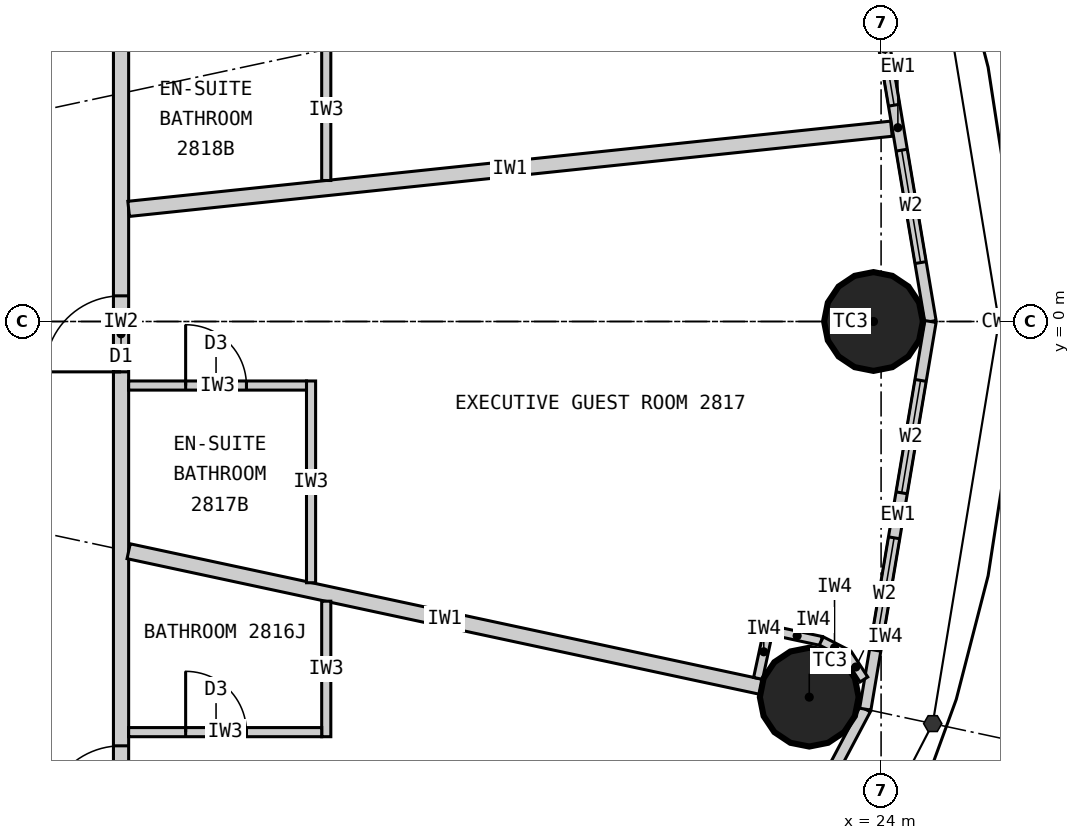
"""IFC4 building model, lengths in metres.
Left out: names, types, materials, properties, quantities, classifications, styles, units other than length and angle.
Written with IfcOpenShell. Run it as: python <this file> out.ifc"""

import sys

from ifc_helpers import new_model, si_unit, direction, frame, frame_2d, origin, origin_2d, place, context, subcontext, project, spatial, rectangle, circle, extrude, element, fill, save


model = new_model("IFC4")
c1 = context("Model", 3, precision=1e-05, world=origin(), true_north=direction((0.0, 1.0)))
c2 = subcontext(c1, "Body", "Model", "MODEL_VIEW")
j1 = project(units=[si_unit("LENGTHUNIT", "METRE"), si_unit("PLANEANGLEUNIT", "RADIAN")], contexts=[c1])
p1 = place(None, origin())
s1 = spatial("IfcSite", under=j1, at=p1, CompositionType="ELEMENT")
p2 = place(p1, origin())
s2 = spatial("IfcBuilding", under=s1, at=p2, CompositionType="ELEMENT")
p3 = place(p2, frame((0.0, 0.0, 112.2)))
s3 = spatial("IfcBuildingStorey", under=s2, at=p3, CompositionType="ELEMENT", Elevation=112.2)
for number, where, z_axis, x_axis in (
    (1, (23.9, 0.0, 0.0), (0.0, 0.0, 1.0), (1.0, 0.0, 0.0)),
    (2, (23.055, -4.942, 0.0), (0.0, 0.0, 1.0), (1.0, 0.0, 0.0)),
):
    element("IfcColumn", number, at=place(p3, frame(where, z_axis=z_axis, x_axis=x_axis)), inside=s3, PredefinedType="COLUMN", context=c2, shape_type="SweptSolid", body=[
        extrude(circle(Radius=0.65, at=origin_2d()), origin(), (0.0, 0.0, 1.0), 3.3),
    ])
p4 = place(p3, frame((24.65, 0.0, 0.0), z_axis=(0.0, 0.0, 1.0), x_axis=(-0.165883894218, 0.986145290329, 0.0)))
e3 = element("IfcWall", 3, at=p4, inside=s3, PredefinedType="ELEMENTEDWALL", context=c2, shape_type="SweptSolid", body=[
    extrude(rectangle(XDim=5.172, YDim=0.15, at=frame_2d((2.586, 0.0))), origin(), (0.0, 0.0, 1.0), 3.12),
])
p5 = place(p4, frame((0.786, 0.0, 0.9)))
e4 = element("IfcOpeningElement", 4, at=p5, cuts=e3, PredefinedType="OPENING", context=c2, shape_type="SweptSolid", body=[
    extrude(rectangle(XDim=1.5, YDim=1.9, at=frame_2d((0.75, 0.95))), frame((0.0, 0.085, 0.0), z_axis=(0.0, -1.0, 0.0), x_axis=(1.0, 0.0, 0.0)), (0.0, 0.0, 1.0), 0.17),
])
p6 = place(p4, frame((2.886, 0.0, 0.9)))
e5 = element("IfcOpeningElement", 5, at=p6, cuts=e3, PredefinedType="OPENING", context=c2, shape_type="SweptSolid", body=[
    extrude(rectangle(XDim=1.5, YDim=1.9, at=frame_2d((0.75, 0.95))), frame((0.0, 0.085, 0.0), z_axis=(0.0, -1.0, 0.0), x_axis=(1.0, 0.0, 0.0)), (0.0, 0.0, 1.0), 0.17),
])
p7 = place(p3, frame((21.287, -9.832, 0.0), z_axis=(0.0, 0.0, 1.0), x_axis=(0.467814388454, 0.883826735257, 0.0)))
e6 = element("IfcWall", 6, at=p7, inside=s3, PredefinedType="ELEMENTEDWALL", context=c2, shape_type="SweptSolid", body=[
    extrude(rectangle(XDim=5.354, YDim=0.15, at=frame_2d((2.677, 0.0))), origin(), (0.0, 0.0, 1.0), 3.12),
])
p8 = place(p7, frame((0.877, 0.0, 0.9)))
e7 = element("IfcOpeningElement", 7, at=p8, cuts=e6, PredefinedType="OPENING", context=c2, shape_type="SweptSolid", body=[
    extrude(rectangle(XDim=1.5, YDim=1.9, at=frame_2d((0.75, 0.95))), frame((0.0, 0.085, 0.0), z_axis=(0.0, -1.0, 0.0), x_axis=(1.0, 0.0, 0.0)), (0.0, 0.0, 1.0), 0.17),
])
p9 = place(p7, frame((2.977, 0.0, 0.9)))
e8 = element("IfcOpeningElement", 8, at=p9, cuts=e6, PredefinedType="OPENING", context=c2, shape_type="SweptSolid", body=[
    extrude(rectangle(XDim=1.5, YDim=1.9, at=frame_2d((0.75, 0.95))), frame((0.0, 0.085, 0.0), z_axis=(0.0, -1.0, 0.0), x_axis=(1.0, 0.0, 0.0)), (0.0, 0.0, 1.0), 0.17),
])
p10 = place(p3, frame((23.792, -5.1, 0.0), z_axis=(0.0, 0.0, 1.0), x_axis=(0.165883894218, 0.986145290329, 0.0)))
e9 = element("IfcWall", 9, at=p10, inside=s3, PredefinedType="ELEMENTEDWALL", context=c2, shape_type="SweptSolid", body=[
    extrude(rectangle(XDim=5.172, YDim=0.15, at=frame_2d((2.586, 0.0))), origin(), (0.0, 0.0, 1.0), 3.12),
])
p11 = place(p10, frame((0.786, 0.0, 0.9)))
e10 = element("IfcOpeningElement", 10, at=p11, cuts=e9, PredefinedType="OPENING", context=c2, shape_type="SweptSolid", body=[
    extrude(rectangle(XDim=1.5, YDim=1.9, at=frame_2d((0.75, 0.95))), frame((0.0, 0.085, 0.0), z_axis=(0.0, -1.0, 0.0), x_axis=(1.0, 0.0, 0.0)), (0.0, 0.0, 1.0), 0.17),
])
p12 = place(p10, frame((2.886, 0.0, 0.9)))
e11 = element("IfcOpeningElement", 11, at=p12, cuts=e9, PredefinedType="OPENING", context=c2, shape_type="SweptSolid", body=[
    extrude(rectangle(XDim=1.5, YDim=1.9, at=frame_2d((0.75, 0.95))), frame((0.0, 0.085, 0.0), z_axis=(0.0, -1.0, 0.0), x_axis=(1.0, 0.0, 0.0)), (0.0, 0.0, 1.0), 0.17),
])
p13 = place(p3, frame((14.0, -9.9, 0.0), z_axis=(0.0, 0.0, 1.0), x_axis=(0.0, 1.0, 0.0)))
e12 = element("IfcWall", 12, at=p13, inside=s3, PredefinedType="PARTITIONING", context=c2, shape_type="SweptSolid", body=[
    extrude(rectangle(XDim=19.8, YDim=0.2, at=frame_2d((9.9, 0.0))), origin(), (0.0, 0.0, 1.0), 3.12),
])
p14 = place(p13, frame((3.318, 0.0, 0.0)))
e13 = element("IfcOpeningElement", 13, at=p14, cuts=e12, PredefinedType="OPENING", context=c2, shape_type="SweptSolid", body=[
    extrude(rectangle(XDim=1.0, YDim=2.2, at=frame_2d((0.5, 1.1))), frame((0.0, 0.11, 0.0), z_axis=(0.0, -1.0, 0.0), x_axis=(1.0, 0.0, 0.0)), (0.0, 0.0, 1.0), 0.22),
])
p15 = place(p13, frame((9.238, 0.0, 0.0)))
e14 = element("IfcOpeningElement", 14, at=p15, cuts=e12, PredefinedType="OPENING", context=c2, shape_type="SweptSolid", body=[
    extrude(rectangle(XDim=1.0, YDim=2.2, at=frame_2d((0.5, 1.1))), frame((0.0, 0.11, 0.0), z_axis=(0.0, -1.0, 0.0), x_axis=(1.0, 0.0, 0.0)), (0.0, 0.0, 1.0), 0.22),
])
p16 = place(p13, frame((13.742, 0.0, 0.0)))
e15 = element("IfcOpeningElement", 15, at=p16, cuts=e12, PredefinedType="OPENING", context=c2, shape_type="SweptSolid", body=[
    extrude(rectangle(XDim=1.0, YDim=2.2, at=frame_2d((0.5, 1.1))), frame((0.0, 0.11, 0.0), z_axis=(0.0, -1.0, 0.0), x_axis=(1.0, 0.0, 0.0)), (0.0, 0.0, 1.0), 0.22),
])
p17 = place(p13, frame((18.698, 0.0, 0.0)))
e16 = element("IfcOpeningElement", 16, at=p17, cuts=e12, PredefinedType="OPENING", context=c2, shape_type="SweptSolid", body=[
    extrude(rectangle(XDim=1.0, YDim=2.2, at=frame_2d((0.5, 1.1))), frame((0.0, 0.11, 0.0), z_axis=(0.0, -1.0, 0.0), x_axis=(1.0, 0.0, 0.0)), (0.0, 0.0, 1.0), 0.22),
])
p18 = place(p3, frame((14.1, 1.482, 0.0), z_axis=(0.0, 0.0, 1.0), x_axis=(0.994523202615, 0.104516024894, 0.0)))
e17 = element("IfcWall", 17, at=p18, inside=s3, PredefinedType="PARTITIONING", context=c2, shape_type="SweptSolid", body=[
    extrude(rectangle(XDim=10.091, YDim=0.2, at=frame_2d((5.045, 0.0))), origin(), (0.0, 0.0, 1.0), 2.47),
])
p19 = place(p3, frame((14.1, -3.022, 0.0), z_axis=(0.0, 0.0, 1.0), x_axis=(0.977783513367, -0.209617272638, 0.0)))
e18 = element("IfcWall", 18, at=p19, inside=s3, PredefinedType="PARTITIONING", context=c2, shape_type="SweptSolid", body=[
    extrude(rectangle(XDim=8.508, YDim=0.2, at=frame_2d((4.254, 0.0))), origin(), (0.0, 0.0, 1.0), 2.37),
])
p20 = place(p3, frame((16.7, -3.68, 0.0), z_axis=(0.0, 0.0, 1.0), x_axis=(0.0, -1.0, 0.0)))
e19 = element("IfcWall", 19, at=p20, inside=s3, PredefinedType="PARTITIONING", context=c2, shape_type="SweptSolid", body=[
    extrude(rectangle(XDim=1.783, YDim=0.12, at=frame_2d((0.891, 0.0))), origin(), (0.0, 0.0, 1.0), 3.12),
])
p21 = place(p3, frame((14.1, -5.403, 0.0), z_axis=(0.0, 0.0, 1.0), x_axis=(1.0, 0.0, 0.0)))
e20 = element("IfcWall", 20, at=p21, inside=s3, PredefinedType="PARTITIONING", context=c2, shape_type="SweptSolid", body=[
    extrude(rectangle(XDim=2.54, YDim=0.12, at=frame_2d((1.27, 0.0))), origin(), (0.0, 0.0, 1.0), 3.12),
])
p22 = place(p21, frame((0.75, 0.0, 0.0)))
e21 = element("IfcOpeningElement", 21, at=p22, cuts=e20, PredefinedType="OPENING", context=c2, shape_type="SweptSolid", body=[
    extrude(rectangle(XDim=0.8, YDim=2.1, at=frame_2d((0.4, 1.05))), frame((0.0, 0.07, 0.0), z_axis=(0.0, -1.0, 0.0), x_axis=(1.0, 0.0, 0.0)), (0.0, 0.0, 1.0), 0.14),
])
p23 = place(p3, frame((16.5, -3.437, 0.0), z_axis=(0.0, 0.0, 1.0), x_axis=(0.0, 1.0, 0.0)))
e22 = element("IfcWall", 22, at=p23, inside=s3, PredefinedType="PARTITIONING", context=c2, shape_type="SweptSolid", body=[
    extrude(rectangle(XDim=2.655, YDim=0.12, at=frame_2d((1.327, 0.0))), origin(), (0.0, 0.0, 1.0), 3.12),
])
p24 = place(p3, frame((14.1, -0.843, 0.0), z_axis=(0.0, 0.0, 1.0), x_axis=(1.0, 0.0, 0.0)))
e23 = element("IfcWall", 23, at=p24, inside=s3, PredefinedType="PARTITIONING", context=c2, shape_type="SweptSolid", body=[
    extrude(rectangle(XDim=2.34, YDim=0.12, at=frame_2d((1.17, 0.0))), origin(), (0.0, 0.0, 1.0), 3.12),
])
p25 = place(p24, frame((0.75, 0.0, 0.0)))
e24 = element("IfcOpeningElement", 24, at=p25, cuts=e23, PredefinedType="OPENING", context=c2, shape_type="SweptSolid", body=[
    extrude(rectangle(XDim=0.8, YDim=2.1, at=frame_2d((0.4, 1.05))), frame((0.0, 0.07, 0.0), z_axis=(0.0, -1.0, 0.0), x_axis=(1.0, 0.0, 0.0)), (0.0, 0.0, 1.0), 0.14),
])
p26 = place(p3, frame((16.7, 1.855, 0.0), z_axis=(0.0, 0.0, 1.0), x_axis=(0.0, 1.0, 0.0)))
e25 = element("IfcWall", 25, at=p26, inside=s3, PredefinedType="PARTITIONING", context=c2, shape_type="SweptSolid", body=[
    extrude(rectangle(XDim=1.867, YDim=0.12, at=frame_2d((0.933, 0.0))), origin(), (0.0, 0.0, 1.0), 3.12),
])
p27 = place(p3, frame((22.382, -4.695, 0.0), z_axis=(0.0, 0.0, 1.0), x_axis=(0.209808658628, 0.977742464438, 0.0)))
e26 = element("IfcWall", 26, at=p27, inside=s3, PredefinedType="PARTITIONING", context=c2, shape_type="SweptSolid", body=[
    extrude(rectangle(XDim=0.716, YDim=0.12, at=frame_2d((0.358, 0.0))), origin(), (0.0, 0.0, 1.0), 3.12),
])
p28 = place(p3, frame((22.578, -4.067, 0.0), z_axis=(0.0, 0.0, 1.0), x_axis=(0.977802414077, -0.209529088731, 0.0)))
e27 = element("IfcWall", 27, at=p28, inside=s3, PredefinedType="PARTITIONING", context=c2, shape_type="SweptSolid", body=[
    extrude(rectangle(XDim=0.65, YDim=0.12, at=frame_2d((0.325, 0.0))), origin(), (0.0, 0.0, 1.0), 3.12),
])
for number, where, z_axis, x_axis in (
    (28, (23.213, -4.203, 0.0), (0.0, 0.0, 1.0), (0.89, -0.456, 0.0)),
    (29, (23.562, -4.381, 0.0), (0.0, 0.0, 1.0), (0.543, -0.84, 0.0)),
):
    element("IfcWall", number, at=place(p3, frame(where, z_axis=z_axis, x_axis=x_axis)), inside=s3, PredefinedType="PARTITIONING", context=c2, shape_type="SweptSolid", body=[
        extrude(rectangle(XDim=0.391, YDim=0.12, at=frame_2d((0.196, 0.0))), origin(), (0.0, 0.0, 1.0), 3.12),
    ])
p29 = place(p5, origin())
e30 = element("IfcWindow", 30, at=p29, inside=s3, PartitioningType="SINGLE_PANEL", PredefinedType="WINDOW", context=c2, shape_type="SweptSolid", body=[
    extrude(rectangle(XDim=1.5, YDim=1.9, at=frame_2d((0.75, 0.95))), frame((0.0, 0.03, 0.0), z_axis=(0.0, -1.0, 0.0), x_axis=(1.0, 0.0, 0.0)), (0.0, 0.0, 1.0), 0.06),
])
fill(e4, e30)
p30 = place(p6, origin())
e31 = element("IfcWindow", 31, at=p30, inside=s3, PartitioningType="SINGLE_PANEL", PredefinedType="WINDOW", context=c2, shape_type="SweptSolid", body=[
    extrude(rectangle(XDim=1.5, YDim=1.9, at=frame_2d((0.75, 0.95))), frame((0.0, 0.03, 0.0), z_axis=(0.0, -1.0, 0.0), x_axis=(1.0, 0.0, 0.0)), (0.0, 0.0, 1.0), 0.06),
])
fill(e5, e31)
p31 = place(p11, origin())
e32 = element("IfcWindow", 32, at=p31, inside=s3, PartitioningType="SINGLE_PANEL", PredefinedType="WINDOW", context=c2, shape_type="SweptSolid", body=[
    extrude(rectangle(XDim=1.5, YDim=1.9, at=frame_2d((0.75, 0.95))), frame((0.0, 0.03, 0.0), z_axis=(0.0, -1.0, 0.0), x_axis=(1.0, 0.0, 0.0)), (0.0, 0.0, 1.0), 0.06),
])
fill(e10, e32)
p32 = place(p12, origin())
e33 = element("IfcWindow", 33, at=p32, inside=s3, PartitioningType="SINGLE_PANEL", PredefinedType="WINDOW", context=c2, shape_type="SweptSolid", body=[
    extrude(rectangle(XDim=1.5, YDim=1.9, at=frame_2d((0.75, 0.95))), frame((0.0, 0.03, 0.0), z_axis=(0.0, -1.0, 0.0), x_axis=(1.0, 0.0, 0.0)), (0.0, 0.0, 1.0), 0.06),
])
fill(e11, e33)
p33 = place(p22, origin())
e34 = element("IfcDoor", 34, at=p33, inside=s3, OperationType="SINGLE_SWING_LEFT", PredefinedType="DOOR", context=c2, shape_type="SweptSolid", body=[
    extrude(rectangle(XDim=0.8, YDim=2.1, at=frame_2d((0.4, 1.05))), frame((0.0, 0.025, 0.0), z_axis=(0.0, -1.0, 0.0), x_axis=(1.0, 0.0, 0.0)), (0.0, 0.0, 1.0), 0.05),
])
fill(e21, e34)
p34 = place(p14, origin())
e35 = element("IfcDoor", 35, at=p34, inside=s3, OperationType="SINGLE_SWING_LEFT", PredefinedType="DOOR", context=c2, shape_type="SweptSolid", body=[
    extrude(rectangle(XDim=1.0, YDim=2.2, at=frame_2d((0.5, 1.1))), frame((0.0, 0.025, 0.0), z_axis=(0.0, -1.0, 0.0), x_axis=(1.0, 0.0, 0.0)), (0.0, 0.0, 1.0), 0.05),
])
fill(e13, e35)
p35 = place(p25, origin())
e36 = element("IfcDoor", 36, at=p35, inside=s3, OperationType="SINGLE_SWING_LEFT", PredefinedType="DOOR", context=c2, shape_type="SweptSolid", body=[
    extrude(rectangle(XDim=0.8, YDim=2.1, at=frame_2d((0.4, 1.05))), frame((0.0, 0.025, 0.0), z_axis=(0.0, -1.0, 0.0), x_axis=(1.0, 0.0, 0.0)), (0.0, 0.0, 1.0), 0.05),
])
fill(e24, e36)
p36 = place(p15, origin())
e37 = element("IfcDoor", 37, at=p36, inside=s3, OperationType="SINGLE_SWING_LEFT", PredefinedType="DOOR", context=c2, shape_type="SweptSolid", body=[
    extrude(rectangle(XDim=1.0, YDim=2.2, at=frame_2d((0.5, 1.1))), frame((0.0, 0.025, 0.0), z_axis=(0.0, -1.0, 0.0), x_axis=(1.0, 0.0, 0.0)), (0.0, 0.0, 1.0), 0.05),
])
fill(e14, e37)
save(model, sys.argv[1])
